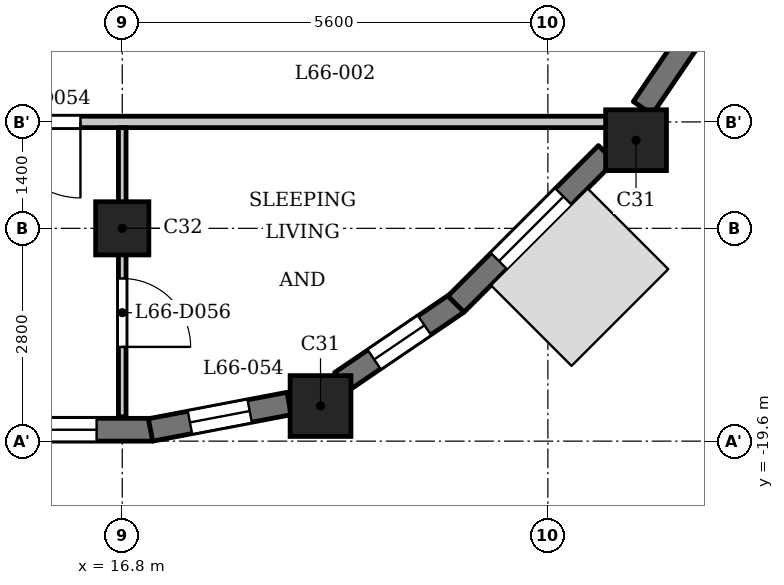
"""IFC4 building model, lengths in metres.
Left out: names, types, materials, properties, quantities, classifications, styles, units other than length and angle.
Written with IfcOpenShell. Run it as: python <this file> out.ifc"""

import sys

from ifc_helpers import new_model, si_unit, direction, frame, frame_2d, origin, origin_2d, place, context, subcontext, project, spatial, rectangle, extrude, element, fill, save


model = new_model("IFC4")
c1 = context("Model", 3, precision=1e-05, world=origin(), true_north=direction((0.0, 1.0)))
c2 = subcontext(c1, "Body", "Model", "MODEL_VIEW")
j1 = project(units=[si_unit("LENGTHUNIT", "METRE"), si_unit("PLANEANGLEUNIT", "RADIAN")], contexts=[c1])
p1 = place(None, origin())
s1 = spatial("IfcSite", under=j1, at=p1, CompositionType="ELEMENT")
p2 = place(p1, origin())
s2 = spatial("IfcBuilding", under=s1, at=p2, CompositionType="ELEMENT")
p3 = place(p2, frame((0.0, 0.0, 255.7)))
s3 = spatial("IfcBuildingStorey", under=s2, at=p3, CompositionType="ELEMENT", Elevation=255.7)
for number, where, z_axis, x_axis in (
    (1, (19.409, -19.138, 0.0), (0.0, 0.0, 1.0), (1.0, 0.0, 0.0)),
    (2, (23.56, -15.64, 0.0), (0.0, 0.0, 1.0), (1.0, 0.0, 0.0)),
):
    element("IfcColumn", number, at=place(p3, frame(where, z_axis=z_axis, x_axis=x_axis)), inside=s3, PredefinedType="COLUMN", context=c2, shape_type="SweptSolid", body=[
        extrude(rectangle(XDim=0.8, YDim=0.8, at=origin_2d()), origin(), (0.0, 0.0, 1.0), 3.5),
    ])
p4 = place(p3, frame((16.8, -16.8, 0.0), z_axis=(0.0, 0.0, 1.0), x_axis=(1.0, 0.0, 0.0)))
e3 = element("IfcColumn", 3, at=p4, inside=s3, PredefinedType="COLUMN", context=c2, shape_type="SweptSolid", body=[
    extrude(rectangle(XDim=0.7, YDim=0.7, at=origin_2d()), origin(), (0.0, 0.0, 1.0), 3.5),
])
p5 = place(p3, frame((14.4, -19.45, 0.0), z_axis=(0.0, 0.0, 1.0), x_axis=(1.0, 0.0, 0.0)))
e4 = element("IfcWall", 4, at=p5, inside=s3, PredefinedType="SOLIDWALL", context=c2, shape_type="SweptSolid", body=[
    extrude(rectangle(XDim=2.8, YDim=0.3, at=frame_2d((1.4, 0.0))), origin(), (0.0, 0.0, 1.0), 2.55),
])
p6 = place(p5, frame((0.262, 0.0, 0.9)))
e5 = element("IfcOpeningElement", 5, at=p6, cuts=e4, PredefinedType="OPENING", context=c2, shape_type="SweptSolid", body=[
    extrude(rectangle(XDim=1.8, YDim=1.25, at=frame_2d((0.9, 0.625))), frame((0.0, 0.16, 0.0), z_axis=(0.0, -1.0, 0.0), x_axis=(1.0, 0.0, 0.0)), (0.0, 0.0, 1.0), 0.32),
])
p7 = place(p3, frame((17.172, -19.453, 0.0), z_axis=(0.0, 0.0, 1.0), x_axis=(0.982301706131, 0.187305520826, 0.0)))
e6 = element("IfcWall", 6, at=p7, inside=s3, PredefinedType="SOLIDWALL", context=c2, shape_type="SweptSolid", body=[
    extrude(rectangle(XDim=1.856, YDim=0.3, at=frame_2d((0.928, 0.0))), origin(), (0.0, 0.0, 1.0), 2.55),
])
p8 = place(p7, frame((0.528, 0.0, 0.6)))
e7 = element("IfcOpeningElement", 7, at=p8, cuts=e6, PredefinedType="OPENING", context=c2, shape_type="SweptSolid", body=[
    extrude(rectangle(XDim=0.8, YDim=1.55, at=frame_2d((0.4, 0.775))), frame((0.0, 0.16, 0.0), z_axis=(0.0, -1.0, 0.0), x_axis=(1.0, 0.0, 0.0)), (0.0, 0.0, 1.0), 0.32),
])
p9 = place(p3, frame((19.678, -18.822, 0.0), z_axis=(0.0, 0.0, 1.0), x_axis=(0.826997446962, 0.562205676526, 0.0)))
e8 = element("IfcWall", 8, at=p9, inside=s3, PredefinedType="SOLIDWALL", context=c2, shape_type="SweptSolid", body=[
    extrude(rectangle(XDim=1.856, YDim=0.3, at=frame_2d((0.928, 0.0))), origin(), (0.0, 0.0, 1.0), 2.55),
])
p10 = place(p9, frame((0.528, 0.0, 0.6)))
e9 = element("IfcOpeningElement", 9, at=p10, cuts=e8, PredefinedType="OPENING", context=c2, shape_type="SweptSolid", body=[
    extrude(rectangle(XDim=0.8, YDim=1.55, at=frame_2d((0.4, 0.775))), frame((0.0, 0.16, 0.0), z_axis=(0.0, -1.0, 0.0), x_axis=(1.0, 0.0, 0.0)), (0.0, 0.0, 1.0), 0.32),
])
p11 = place(p3, frame((21.191, -17.797, 0.0), z_axis=(0.0, 0.0, 1.0), x_axis=(0.707106781187, 0.707106781187, 0.0)))
e10 = element("IfcWall", 10, at=p11, inside=s3, PredefinedType="SOLIDWALL", context=c2, shape_type="SweptSolid", body=[
    extrude(rectangle(XDim=2.8, YDim=0.3, at=frame_2d((1.4, 0.0))), origin(), (0.0, 0.0, 1.0), 2.55),
])
p12 = place(p11, frame((0.8, 0.0, 0.6)))
e11 = element("IfcOpeningElement", 11, at=p12, cuts=e10, PredefinedType="OPENING", context=c2, shape_type="SweptSolid", body=[
    extrude(rectangle(XDim=1.2, YDim=1.55, at=frame_2d((0.6, 0.775))), frame((0.0, 0.16, 0.0), z_axis=(0.0, -1.0, 0.0), x_axis=(1.0, 0.0, 0.0)), (0.0, 0.0, 1.0), 0.32),
])
p13 = place(p3, frame((23.648, -15.217, 0.0), z_axis=(0.0, 0.0, 1.0), x_axis=(0.562043265151, 0.827107833416, 0.0)))
e12 = element("IfcWall", 12, at=p13, inside=s3, PredefinedType="SOLIDWALL", context=c2, shape_type="SweptSolid", body=[
    extrude(rectangle(XDim=1.377, YDim=0.3, at=frame_2d((0.688, 0.0))), origin(), (0.0, 0.0, 1.0), 2.55),
])
p14 = place(p3, frame((-23.322, -15.4, 0.0), z_axis=(0.0, 0.0, 1.0), x_axis=(1.0, 0.0, 0.0)))
e13 = element("IfcWall", 13, at=p14, inside=s3, PredefinedType="PARTITIONING", context=c2, shape_type="SweptSolid", body=[
    extrude(rectangle(XDim=46.872, YDim=0.15, at=frame_2d((23.436, 0.0))), origin(), (0.0, 0.0, 1.0), 3.2),
])
p15 = place(p14, frame((7.172, 0.0, 0.0)))
e14 = element("IfcOpeningElement", 14, at=p15, cuts=e13, PredefinedType="OPENING", context=c2, shape_type="SweptSolid", body=[
    extrude(rectangle(XDim=1.0, YDim=2.1, at=frame_2d((0.5, 1.05))), frame((0.0, 0.085, 0.0), z_axis=(0.0, -1.0, 0.0), x_axis=(1.0, 0.0, 0.0)), (0.0, 0.0, 1.0), 0.17),
])
p16 = place(p14, frame((14.922, 0.0, 0.0)))
e15 = element("IfcOpeningElement", 15, at=p16, cuts=e13, PredefinedType="OPENING", context=c2, shape_type="SweptSolid", body=[
    extrude(rectangle(XDim=1.0, YDim=2.1, at=frame_2d((0.5, 1.05))), frame((0.0, 0.085, 0.0), z_axis=(0.0, -1.0, 0.0), x_axis=(1.0, 0.0, 0.0)), (0.0, 0.0, 1.0), 0.17),
])
p17 = place(p14, frame((26.372, 0.0, 0.0)))
e16 = element("IfcOpeningElement", 16, at=p17, cuts=e13, PredefinedType="OPENING", context=c2, shape_type="SweptSolid", body=[
    extrude(rectangle(XDim=1.0, YDim=2.1, at=frame_2d((0.5, 1.05))), frame((0.0, 0.085, 0.0), z_axis=(0.0, -1.0, 0.0), x_axis=(1.0, 0.0, 0.0)), (0.0, 0.0, 1.0), 0.17),
])
p18 = place(p14, frame((38.572, 0.0, 0.0)))
e17 = element("IfcOpeningElement", 17, at=p18, cuts=e13, PredefinedType="OPENING", context=c2, shape_type="SweptSolid", body=[
    extrude(rectangle(XDim=1.0, YDim=2.1, at=frame_2d((0.5, 1.05))), frame((0.0, 0.085, 0.0), z_axis=(0.0, -1.0, 0.0), x_axis=(1.0, 0.0, 0.0)), (0.0, 0.0, 1.0), 0.17),
])
p19 = place(p3, frame((16.8, -19.28, 0.0), z_axis=(0.0, 0.0, 1.0), x_axis=(0.0, 1.0, 0.0)))
e18 = element("IfcWall", 18, at=p19, inside=s3, PredefinedType="PARTITIONING", context=c2, shape_type="SweptSolid", body=[
    extrude(rectangle(XDim=3.805, YDim=0.1, at=frame_2d((1.902, 0.0))), origin(), (0.0, 0.0, 1.0), 3.2),
])
p20 = place(p19, frame((0.92, 0.0, 0.0)))
e19 = element("IfcOpeningElement", 19, at=p20, cuts=e18, PredefinedType="OPENING", context=c2, shape_type="SweptSolid", body=[
    extrude(rectangle(XDim=0.9, YDim=2.1, at=frame_2d((0.45, 1.05))), frame((0.0, 0.06, 0.0), z_axis=(0.0, -1.0, 0.0), x_axis=(1.0, 0.0, 0.0)), (0.0, 0.0, 1.0), 0.12),
])
p21 = place(p18, origin())
e20 = element("IfcDoor", 20, at=p21, inside=s3, OperationType="SINGLE_SWING_RIGHT", PredefinedType="DOOR", context=c2, shape_type="SweptSolid", body=[
    extrude(rectangle(XDim=1.0, YDim=2.1, at=frame_2d((0.5, 1.05))), frame((0.0, 0.025, 0.0), z_axis=(0.0, -1.0, 0.0), x_axis=(1.0, 0.0, 0.0)), (0.0, 0.0, 1.0), 0.05),
])
fill(e17, e20)
p22 = place(p20, origin())
e21 = element("IfcDoor", 21, at=p22, inside=s3, OperationType="SINGLE_SWING_LEFT", PredefinedType="DOOR", context=c2, shape_type="SweptSolid", body=[
    extrude(rectangle(XDim=0.9, YDim=2.1, at=frame_2d((0.45, 1.05))), frame((0.0, 0.025, 0.0), z_axis=(0.0, -1.0, 0.0), x_axis=(1.0, 0.0, 0.0)), (0.0, 0.0, 1.0), 0.05),
])
fill(e19, e21)
p23 = place(p6, origin())
e22 = element("IfcWindow", 22, at=p23, inside=s3, PartitioningType="SINGLE_PANEL", PredefinedType="WINDOW", context=c2, shape_type="SweptSolid", body=[
    extrude(rectangle(XDim=1.8, YDim=1.25, at=frame_2d((0.9, 0.625))), frame((0.0, 0.03, 0.0), z_axis=(0.0, -1.0, 0.0), x_axis=(1.0, 0.0, 0.0)), (0.0, 0.0, 1.0), 0.06),
])
fill(e5, e22)
p24 = place(p8, origin())
e23 = element("IfcWindow", 23, at=p24, inside=s3, PartitioningType="SINGLE_PANEL", PredefinedType="WINDOW", context=c2, shape_type="SweptSolid", body=[
    extrude(rectangle(XDim=0.8, YDim=1.55, at=frame_2d((0.4, 0.775))), frame((0.0, 0.03, 0.0), z_axis=(0.0, -1.0, 0.0), x_axis=(1.0, 0.0, 0.0)), (0.0, 0.0, 1.0), 0.06),
])
fill(e7, e23)
p25 = place(p10, origin())
e24 = element("IfcWindow", 24, at=p25, inside=s3, PartitioningType="SINGLE_PANEL", PredefinedType="WINDOW", context=c2, shape_type="SweptSolid", body=[
    extrude(rectangle(XDim=0.8, YDim=1.55, at=frame_2d((0.4, 0.775))), frame((0.0, 0.03, 0.0), z_axis=(0.0, -1.0, 0.0), x_axis=(1.0, 0.0, 0.0)), (0.0, 0.0, 1.0), 0.06),
])
fill(e9, e24)
p26 = place(p12, origin())
e25 = element("IfcWindow", 25, at=p26, inside=s3, PartitioningType="SINGLE_PANEL", PredefinedType="WINDOW", context=c2, shape_type="SweptSolid", body=[
    extrude(rectangle(XDim=1.2, YDim=1.55, at=frame_2d((0.6, 0.775))), frame((0.0, 0.03, 0.0), z_axis=(0.0, -1.0, 0.0), x_axis=(1.0, 0.0, 0.0)), (0.0, 0.0, 1.0), 0.06),
])
fill(e11, e25)
save(model, sys.argv[1])
